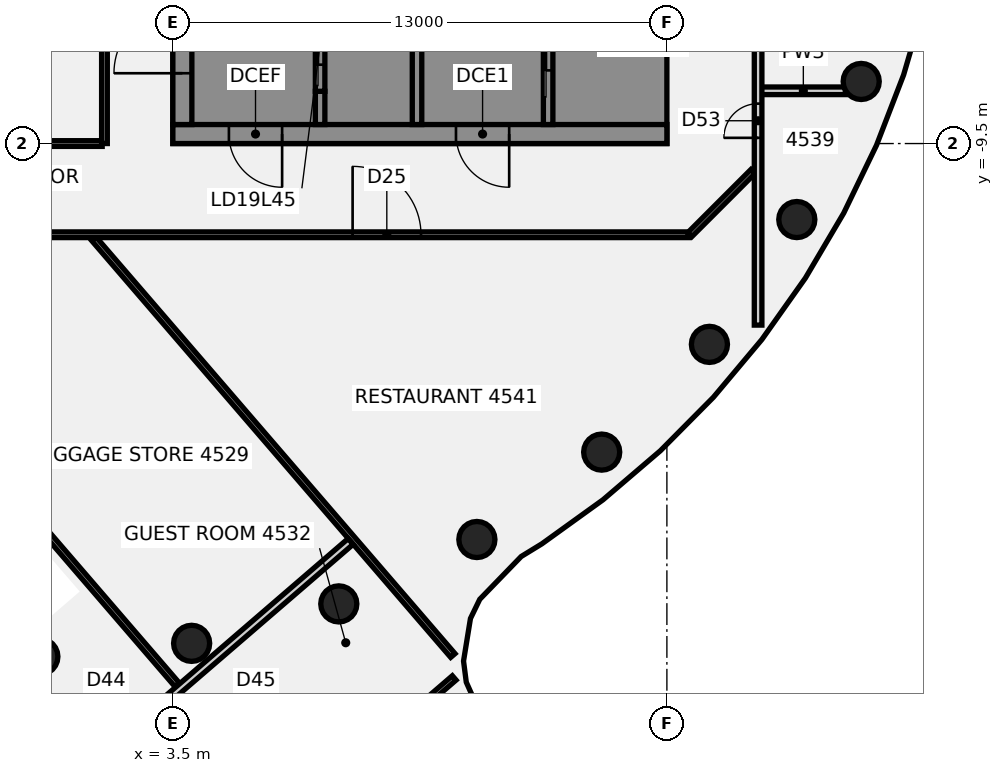
"""IFC4 building model, lengths in metres.
Left out: names, types, materials, properties, quantities, classifications, styles, units other than length and angle.
Written with IfcOpenShell. Run it as: python <this file> out.ifc"""

import sys

from ifc_helpers import new_model, si_unit, direction, frame, frame_2d, origin, origin_2d, place, context, subcontext, project, spatial, polyline, rectangle, circle, outline, extrude, element, fill, save


model = new_model("IFC4")
c1 = context("Model", 3, precision=1e-05, world=origin(), true_north=direction((0.0, 1.0)))
c2 = subcontext(c1, "Body", "Model", "MODEL_VIEW")
j1 = project(units=[si_unit("LENGTHUNIT", "METRE"), si_unit("PLANEANGLEUNIT", "RADIAN")], contexts=[c1])
p1 = place(None, origin())
s1 = spatial("IfcSite", under=j1, at=p1, CompositionType="ELEMENT")
p2 = place(p1, origin())
s2 = spatial("IfcBuilding", under=s1, at=p2, CompositionType="ELEMENT")
p3 = place(p2, frame((0.0, 0.0, 182.5)))
s3 = spatial("IfcBuildingStorey", under=s2, at=p3, CompositionType="ELEMENT", Elevation=182.5)
for number, where, z_axis, x_axis in (
    (1, (0.0, -23.0, -0.14), (0.0, 0.0, 1.0), (1.0, 0.0, 0.0)),
    (2, (3.994, -22.651, -0.14), (0.0, 0.0, 1.0), (1.0, 0.0, 0.0)),
    (3, (7.866, -21.613, -0.14), (0.0, 0.0, 1.0), (1.0, 0.0, 0.0)),
    (4, (11.5, -19.919, -0.14), (0.0, 0.0, 1.0), (1.0, 0.0, 0.0)),
    (5, (14.784, -17.619, -0.14), (0.0, 0.0, 1.0), (1.0, 0.0, 0.0)),
    (6, (17.619, -14.784, -0.14), (0.0, 0.0, 1.0), (1.0, 0.0, 0.0)),
    (7, (19.919, -11.5, -0.14), (0.0, 0.0, 1.0), (1.0, 0.0, 0.0)),
    (8, (21.613, -7.866, -0.14), (0.0, 0.0, 1.0), (1.0, 0.0, 0.0)),
):
    element("IfcColumn", number, at=place(p3, frame(where, z_axis=z_axis, x_axis=x_axis)), inside=s3, PredefinedType="COLUMN", context=c2, shape_type="SweptSolid", body=[
        extrude(circle(Radius=0.475, at=origin_2d()), origin(), (0.0, 0.0, 1.0), 3.6),
    ])
p4 = place(p3, frame((9.584, -24.698, -0.135), z_axis=(0.013229584391, 0.048576320124, 0.998731855515), x_axis=(-0.757717932984, -0.651247732409, 0.04171240903)))
e9 = element("IfcColumn", 9, at=p4, inside=s3, PredefinedType="COLUMN", context=c2, shape_type="SweptSolid", body=[
    extrude(rectangle(XDim=0.9, YDim=0.9, at=origin_2d()), origin(), (0.0, 0.0, 1.0), 3.599),
])
p5 = place(p3, frame((-10.298, -12.499, 0.0), z_axis=(0.0, 0.0, 1.0), x_axis=(0.652713185698, -0.757605106382, 0.0)))
e10 = element("IfcWall", 10, at=p5, inside=s3, PredefinedType="PARTITIONING", context=c2, shape_type="SweptSolid", body=[
    extrude(rectangle(XDim=17.62, YDim=0.15, at=frame_2d((8.81, 0.0))), origin(), (0.0, 0.0, 1.0), 2.864),
])
p6 = place(p5, frame((8.22, 0.0, 0.0)))
e11 = element("IfcOpeningElement", 11, at=p6, cuts=e10, PredefinedType="OPENING", context=c2, shape_type="SweptSolid", body=[
    extrude(rectangle(XDim=1.8, YDim=2.1, at=frame_2d((0.9, 1.05))), frame((0.0, 0.085, 0.0), z_axis=(0.0, -1.0, 0.0), x_axis=(1.0, 0.0, 0.0)), (0.0, 0.0, 1.0), 0.17),
])
p7 = place(p3, frame((-6.499, -12.006, 0.0), z_axis=(0.0, 0.0, 1.0), x_axis=(0.65272794867, -0.757592387122, 0.0)))
e12 = element("IfcWall", 12, at=p7, inside=s3, PredefinedType="PARTITIONING", context=c2, shape_type="SweptSolid", body=[
    extrude(rectangle(XDim=15.494, YDim=0.15, at=frame_2d((7.747, 0.0))), origin(), (0.0, 0.0, 1.0), 2.864),
])
p8 = place(p7, frame((5.11, 0.0, 0.0)))
e13 = element("IfcOpeningElement", 13, at=p8, cuts=e12, PredefinedType="OPENING", context=c2, shape_type="SweptSolid", body=[
    extrude(rectangle(XDim=0.9, YDim=2.1, at=frame_2d((0.45, 1.05))), frame((0.0, 0.085, 0.0), z_axis=(0.0, -1.0, 0.0), x_axis=(1.0, 0.0, 0.0)), (0.0, 0.0, 1.0), 0.17),
])
p9 = place(p3, frame((1.421, -12.006, 0.0), z_axis=(0.0, 0.0, 1.0), x_axis=(0.652713345428, -0.757604968767, 0.0)))
e14 = element("IfcWall", 14, at=p9, inside=s3, PredefinedType="PARTITIONING", context=c2, shape_type="SweptSolid", body=[
    extrude(rectangle(XDim=14.473, YDim=0.15, at=frame_2d((7.236, 0.0))), origin(), (0.0, 0.0, 1.0), 2.864),
])
p10 = place(p3, frame((-17.1, -11.9, 0.0), z_axis=(0.0, 0.0, 1.0), x_axis=(1.0, 0.0, 0.0)))
e15 = element("IfcWall", 15, at=p10, inside=s3, PredefinedType="PARTITIONING", context=c2, shape_type="SweptSolid", body=[
    extrude(rectangle(XDim=34.165, YDim=0.15, at=frame_2d((17.083, 0.0))), origin(), (0.0, 0.0, 1.0), 2.864),
])
p11 = place(p10, frame((8.274, 0.0, 0.0)))
e16 = element("IfcOpeningElement", 16, at=p11, cuts=e15, PredefinedType="OPENING", context=c2, shape_type="SweptSolid", body=[
    extrude(rectangle(XDim=1.8, YDim=2.1, at=frame_2d((0.9, 1.05))), frame((0.0, 0.085, 0.0), z_axis=(0.0, -1.0, 0.0), x_axis=(1.0, 0.0, 0.0)), (0.0, 0.0, 1.0), 0.17),
])
p12 = place(p10, frame((2.1, 0.0, 0.0)))
e17 = element("IfcOpeningElement", 17, at=p12, cuts=e15, PredefinedType="OPENING", context=c2, shape_type="SweptSolid", body=[
    extrude(rectangle(XDim=1.8, YDim=2.1, at=frame_2d((0.9, 1.05))), frame((0.0, 0.085, 0.0), z_axis=(0.0, -1.0, 0.0), x_axis=(1.0, 0.0, 0.0)), (0.0, 0.0, 1.0), 0.17),
])
p13 = place(p10, frame((25.33, 0.0, 0.0)))
e18 = element("IfcOpeningElement", 18, at=p13, cuts=e15, PredefinedType="OPENING", context=c2, shape_type="SweptSolid", body=[
    extrude(rectangle(XDim=1.8, YDim=2.1, at=frame_2d((0.9, 1.05))), frame((0.0, 0.085, 0.0), z_axis=(0.0, -1.0, 0.0), x_axis=(1.0, 0.0, 0.0)), (0.0, 0.0, 1.0), 0.17),
])
p14 = place(p3, frame((-1.64, -9.5, 0.0), z_axis=(0.0, 0.0, 1.0), x_axis=(1.0, 0.0, 0.0)))
e19 = element("IfcWall", 19, at=p14, inside=s3, PredefinedType="PARTITIONING", context=c2, shape_type="SweptSolid", body=[
    extrude(rectangle(XDim=3.28, YDim=0.15, at=frame_2d((1.64, 0.0))), origin(), (0.0, 0.0, 1.0), 2.864),
])
p15 = place(p3, frame((18.985, -8.112, 0.0), z_axis=(0.0, 0.0, 1.0), x_axis=(1.0, 0.0, 0.0)))
e20 = element("IfcWall", 20, at=p15, inside=s3, PredefinedType="PARTITIONING", context=c2, shape_type="SweptSolid", body=[
    extrude(rectangle(XDim=2.211, YDim=0.2, at=frame_2d((1.105, 0.0))), origin(), (0.0, 0.0, 1.0), 2.864),
])
p16 = place(p3, frame((-2.595, -29.251, 0.0), z_axis=(0.0, 0.0, 1.0), x_axis=(0.757604641141, 0.652713725704, 0.0)))
e21 = element("IfcWall", 21, at=p16, inside=s3, PredefinedType="PARTITIONING", context=c2, shape_type="SweptSolid", body=[
    extrude(rectangle(XDim=14.219, YDim=0.2, at=frame_2d((7.109, 0.0))), origin(), (0.0, 0.0, 1.0), 2.864),
])
p17 = place(p16, frame((5.799, 0.0, 0.0)))
e22 = element("IfcOpeningElement", 22, at=p17, cuts=e21, PredefinedType="OPENING", context=c2, shape_type="SweptSolid", body=[
    extrude(rectangle(XDim=1.4, YDim=2.1, at=frame_2d((0.7, 1.05))), frame((0.0, 0.11, 0.0), z_axis=(0.0, -1.0, 0.0), x_axis=(1.0, 0.0, 0.0)), (0.0, 0.0, 1.0), 0.22),
])
p18 = place(p3, frame((10.048, -24.299, 0.0), z_axis=(0.0, 0.0, 1.0), x_axis=(0.75736205632, 0.652995188074, 0.0)))
e23 = element("IfcWall", 23, at=p18, inside=s3, PredefinedType="PARTITIONING", context=c2, shape_type="SweptSolid", body=[
    extrude(rectangle(XDim=1.13, YDim=0.15, at=frame_2d((0.565, 0.0))), origin(), (0.0, 0.0, 1.0), 2.864),
])
p19 = place(p3, frame((17.1, -11.9, 0.0), z_axis=(0.0, 0.0, 1.0), x_axis=(0.707106781187, 0.707106781187, 0.0)))
e24 = element("IfcWall", 24, at=p19, inside=s3, PredefinedType="PARTITIONING", context=c2, shape_type="SweptSolid", body=[
    extrude(rectangle(XDim=2.355, YDim=0.15, at=frame_2d((1.178, 0.0))), origin(), (0.0, 0.0, 1.0), 2.864),
])
p20 = place(p3, frame((1.7, -9.5, 0.0), z_axis=(0.0, 0.0, 1.0), x_axis=(0.0, 1.0, 0.0)))
e25 = element("IfcWall", 25, at=p20, inside=s3, PredefinedType="PARTITIONING", context=c2, shape_type="SweptSolid", body=[
    extrude(rectangle(XDim=19.0, YDim=0.15, at=frame_2d((9.5, 0.0))), origin(), (0.0, 0.0, 1.0), 2.864),
])
p21 = place(p3, frame((18.9, -14.277, 0.0), z_axis=(0.0, 0.0, 1.0), x_axis=(0.0, 1.0, 0.0)))
e26 = element("IfcWall", 26, at=p21, inside=s3, PredefinedType="PARTITIONING", context=c2, shape_type="SweptSolid", body=[
    extrude(rectangle(XDim=24.377, YDim=0.2, at=frame_2d((12.188, 0.0))), origin(), (0.0, 0.0, 1.0), 2.864),
])
p22 = place(p21, frame((4.927, 0.0, 0.0)))
e27 = element("IfcOpeningElement", 27, at=p22, cuts=e26, PredefinedType="OPENING", context=c2, shape_type="SweptSolid", body=[
    extrude(rectangle(XDim=0.9, YDim=2.1, at=frame_2d((0.45, 1.05))), frame((0.0, 0.11, 0.0), z_axis=(0.0, -1.0, 0.0), x_axis=(1.0, 0.0, 0.0)), (0.0, 0.0, 1.0), 0.22),
])
p23 = place(p21, frame((21.481, 0.0, 0.0)))
e28 = element("IfcOpeningElement", 28, at=p23, cuts=e26, PredefinedType="OPENING", context=c2, shape_type="SweptSolid", body=[
    extrude(rectangle(XDim=0.9, YDim=2.1, at=frame_2d((0.45, 1.05))), frame((0.0, 0.11, 0.0), z_axis=(0.0, -1.0, 0.0), x_axis=(1.0, 0.0, 0.0)), (0.0, 0.0, 1.0), 0.22),
])
p24 = place(p3, frame((16.5, -9.25, 0.0), z_axis=(0.0, 0.0, 1.0), x_axis=(-1.0, 0.0, 0.0)))
e29 = element("IfcWall", 29, at=p24, inside=s3, PredefinedType="SHEAR", context=c2, shape_type="SweptSolid", body=[
    extrude(rectangle(XDim=13.0, YDim=0.5, at=frame_2d((6.5, 0.0))), origin(), (0.0, 0.0, 1.0), 3.46),
])
p25 = place(p24, frame((4.15, 0.0, 0.0)))
e30 = element("IfcOpeningElement", 30, at=p25, cuts=e29, PredefinedType="OPENING", context=c2, shape_type="SweptSolid", body=[
    extrude(rectangle(XDim=1.4, YDim=2.1, at=frame_2d((0.7, 1.05))), frame((0.0, 0.26, 0.0), z_axis=(0.0, -1.0, 0.0), x_axis=(1.0, 0.0, 0.0)), (0.0, 0.0, 1.0), 0.52),
])
p26 = place(p24, frame((10.125, 0.0, 0.0)))
e31 = element("IfcOpeningElement", 31, at=p26, cuts=e29, PredefinedType="OPENING", context=c2, shape_type="SweptSolid", body=[
    extrude(rectangle(XDim=1.4, YDim=2.1, at=frame_2d((0.7, 1.05))), frame((0.0, 0.26, 0.0), z_axis=(0.0, -1.0, 0.0), x_axis=(1.0, 0.0, 0.0)), (0.0, 0.0, 1.0), 0.52),
])
p27 = place(p3, origin())
e32 = element("IfcWall", 32, at=p27, inside=s3, PredefinedType="SHEAR", context=c2, shape_type="SweptSolid", body=[
    extrude(outline(polyline([(13.5, -8.125), (13.5, -9.0), (16.0, -9.0), (16.5, -9.0), (16.5, 9.0), (16.0, 9.0), (13.5, 9.0), (13.5, 8.125), (16.0, 8.125), (16.0, 5.625), (13.5, 5.625), (13.5, 5.375), (16.0, 5.375), (16.0, -5.375), (13.5, -5.375), (13.5, -5.625), (16.0, -5.625), (16.0, -8.125), (13.5, -8.125)])), origin(), (0.0, 0.0, 1.0), 3.46),
])
p28 = place(p3, origin())
e33 = element("IfcWall", 33, at=p28, inside=s3, PredefinedType="SHEAR", context=c2, shape_type="SweptSolid", body=[
    extrude(outline(polyline([(7.5, -8.125), (7.5, -9.0), (9.8, -9.0), (9.8, -8.125), (9.8, -5.625), (9.55, -5.625), (9.55, -8.125), (7.5, -8.125)])), origin(), (0.0, 0.0, 1.0), 3.46),
])
p29 = place(p3, frame((7.375, -9.0, 0.0), z_axis=(0.0, 0.0, 1.0), x_axis=(0.0, 1.0, 0.0)))
e34 = element("IfcWall", 34, at=p29, inside=s3, PredefinedType="SHEAR", context=c2, shape_type="SweptSolid", body=[
    extrude(rectangle(XDim=0.875, YDim=0.25, at=frame_2d((0.438, 0.0))), origin(), (0.0, 0.0, 1.0), 3.46),
])
p30 = place(p3, frame((13.375, -9.0, 0.0), z_axis=(0.0, 0.0, 1.0), x_axis=(0.0, 1.0, 0.0)))
e35 = element("IfcWall", 35, at=p30, inside=s3, PredefinedType="SHEAR", context=c2, shape_type="SweptSolid", body=[
    extrude(rectangle(XDim=18.0, YDim=0.25, at=frame_2d((9.0, 0.0))), origin(), (0.0, 0.0, 1.0), 3.46),
])
p31 = place(p30, frame((1.425, 0.0, 0.0)))
e36 = element("IfcOpeningElement", 36, at=p31, cuts=e35, PredefinedType="OPENING", context=c2, shape_type="SweptSolid", body=[
    extrude(rectangle(XDim=1.4, YDim=2.1, at=frame_2d((0.7, 1.05))), frame((0.0, 0.135, 0.0), z_axis=(0.0, -1.0, 0.0), x_axis=(1.0, 0.0, 0.0)), (0.0, 0.0, 1.0), 0.27),
])
p32 = place(p30, frame((8.5, 0.0, 0.0)))
e37 = element("IfcOpeningElement", 37, at=p32, cuts=e35, PredefinedType="OPENING", context=c2, shape_type="SweptSolid", body=[
    extrude(rectangle(XDim=1.0, YDim=2.1, at=frame_2d((0.5, 1.05))), frame((0.0, 0.135, 0.0), z_axis=(0.0, -1.0, 0.0), x_axis=(1.0, 0.0, 0.0)), (0.0, 0.0, 1.0), 0.27),
])
p33 = place(p3, frame((9.925, -9.0, 0.0), z_axis=(0.0, 0.0, 1.0), x_axis=(0.0, 1.0, 0.0)))
e38 = element("IfcWall", 38, at=p33, inside=s3, PredefinedType="SHEAR", context=c2, shape_type="SweptSolid", body=[
    extrude(rectangle(XDim=18.0, YDim=0.25, at=frame_2d((9.0, 0.0))), origin(), (0.0, 0.0, 1.0), 3.46),
])
p34 = place(p33, frame((4.275, 0.0, 0.0)))
e39 = element("IfcOpeningElement", 39, at=p34, cuts=e38, PredefinedType="OPENING", context=c2, shape_type="SweptSolid", body=[
    extrude(rectangle(XDim=1.2, YDim=2.1, at=frame_2d((0.6, 1.05))), frame((0.0, 0.135, 0.0), z_axis=(0.0, -1.0, 0.0), x_axis=(1.0, 0.0, 0.0)), (0.0, 0.0, 1.0), 0.27),
])
p35 = place(p33, frame((7.025, 0.0, 0.0)))
e40 = element("IfcOpeningElement", 40, at=p35, cuts=e38, PredefinedType="OPENING", context=c2, shape_type="SweptSolid", body=[
    extrude(rectangle(XDim=1.2, YDim=2.1, at=frame_2d((0.6, 1.05))), frame((0.0, 0.135, 0.0), z_axis=(0.0, -1.0, 0.0), x_axis=(1.0, 0.0, 0.0)), (0.0, 0.0, 1.0), 0.27),
])
p36 = place(p33, frame((9.825, 0.0, 0.0)))
e41 = element("IfcOpeningElement", 41, at=p36, cuts=e38, PredefinedType="OPENING", context=c2, shape_type="SweptSolid", body=[
    extrude(rectangle(XDim=1.1, YDim=2.1, at=frame_2d((0.55, 1.05))), frame((0.0, 0.135, 0.0), z_axis=(0.0, -1.0, 0.0), x_axis=(1.0, 0.0, 0.0)), (0.0, 0.0, 1.0), 0.27),
])
p37 = place(p3, frame((7.375, -8.125, 0.0), z_axis=(0.0, 0.0, 1.0), x_axis=(0.0, 1.0, 0.0)))
e42 = element("IfcWall", 42, at=p37, inside=s3, PredefinedType="SHEAR", context=c2, shape_type="SweptSolid", body=[
    extrude(rectangle(XDim=2.5, YDim=0.25, at=frame_2d((1.25, 0.0))), origin(), (0.0, 0.0, 1.0), 3.46),
])
p38 = place(p37, frame((0.7, 0.0, 0.0)))
e43 = element("IfcOpeningElement", 43, at=p38, cuts=e42, PredefinedType="OPENING", context=c2, shape_type="SweptSolid", body=[
    extrude(rectangle(XDim=1.1, YDim=2.1, at=frame_2d((0.55, 1.05))), frame((0.0, 0.135, 0.0), z_axis=(0.0, -1.0, 0.0), x_axis=(1.0, 0.0, 0.0)), (0.0, 0.0, 1.0), 0.27),
])
p39 = place(p3, frame((3.75, -9.0, 0.0), z_axis=(0.0, 0.0, 1.0), x_axis=(0.0, 1.0, 0.0)))
e44 = element("IfcWall", 44, at=p39, inside=s3, PredefinedType="SHEAR", context=c2, shape_type="SweptSolid", body=[
    extrude(rectangle(XDim=18.0, YDim=0.5, at=frame_2d((9.0, 0.0))), origin(), (0.0, 0.0, 1.0), 3.46),
])
p40 = place(p39, frame((1.35, 0.0, 0.0)))
e45 = element("IfcOpeningElement", 45, at=p40, cuts=e44, PredefinedType="OPENING", context=c2, shape_type="SweptSolid", body=[
    extrude(rectangle(XDim=1.8, YDim=2.1, at=frame_2d((0.9, 1.05))), frame((0.0, 0.26, 0.0), z_axis=(0.0, -1.0, 0.0), x_axis=(1.0, 0.0, 0.0)), (0.0, 0.0, 1.0), 0.52),
])
p41 = place(p39, frame((11.798, 0.0, 0.0)))
e46 = element("IfcOpeningElement", 46, at=p41, cuts=e44, PredefinedType="OPENING", context=c2, shape_type="SweptSolid", body=[
    extrude(rectangle(XDim=1.0, YDim=2.1, at=frame_2d((0.5, 1.05))), frame((0.0, 0.26, 0.0), z_axis=(0.0, -1.0, 0.0), x_axis=(1.0, 0.0, 0.0)), (0.0, 0.0, 1.0), 0.52),
])
p42 = place(p39, frame((15.323, 0.0, 0.0)))
e47 = element("IfcOpeningElement", 47, at=p42, cuts=e44, PredefinedType="OPENING", context=c2, shape_type="SweptSolid", body=[
    extrude(rectangle(XDim=1.0, YDim=2.1, at=frame_2d((0.5, 1.05))), frame((0.0, 0.26, 0.0), z_axis=(0.0, -1.0, 0.0), x_axis=(1.0, 0.0, 0.0)), (0.0, 0.0, 1.0), 0.52),
])
p43 = place(p13, origin())
e48 = element("IfcDoor", 48, at=p43, inside=s3, OperationType="DOUBLE_DOOR_SINGLE_SWING", PredefinedType="DOOR", context=c2, shape_type="SweptSolid", body=[
    extrude(rectangle(XDim=1.8, YDim=2.1, at=frame_2d((0.9, 1.05))), frame((0.0, 0.025, 0.0), z_axis=(0.0, -1.0, 0.0), x_axis=(1.0, 0.0, 0.0)), (0.0, 0.0, 1.0), 0.05),
])
fill(e18, e48)
p44 = place(p22, frame((0.9, 0.0, 0.0), z_axis=(0.0, 0.0, 1.0), x_axis=(-1.0, 0.0, 0.0)))
e49 = element("IfcDoor", 49, at=p44, inside=s3, OperationType="SINGLE_SWING_LEFT", PredefinedType="DOOR", context=c2, shape_type="SweptSolid", body=[
    extrude(rectangle(XDim=0.9, YDim=2.1, at=frame_2d((0.45, 1.05))), frame((0.0, 0.025, 0.0), z_axis=(0.0, -1.0, 0.0), x_axis=(1.0, 0.0, 0.0)), (0.0, 0.0, 1.0), 0.05),
])
fill(e27, e49)
p45 = place(p25, origin())
e50 = element("IfcDoor", 50, at=p45, inside=s3, OperationType="SINGLE_SWING_LEFT", PredefinedType="DOOR", context=c2, shape_type="SweptSolid", body=[
    extrude(rectangle(XDim=1.4, YDim=2.1, at=frame_2d((0.7, 1.05))), frame((0.0, 0.025, 0.0), z_axis=(0.0, -1.0, 0.0), x_axis=(1.0, 0.0, 0.0)), (0.0, 0.0, 1.0), 0.05),
])
fill(e30, e50)
p46 = place(p26, origin())
e51 = element("IfcDoor", 51, at=p46, inside=s3, OperationType="SINGLE_SWING_LEFT", PredefinedType="DOOR", context=c2, shape_type="SweptSolid", body=[
    extrude(rectangle(XDim=1.4, YDim=2.1, at=frame_2d((0.7, 1.05))), frame((0.0, 0.025, 0.0), z_axis=(0.0, -1.0, 0.0), x_axis=(1.0, 0.0, 0.0)), (0.0, 0.0, 1.0), 0.05),
])
fill(e31, e51)
p47 = place(p40, origin())
e52 = element("IfcDoor", 52, at=p47, inside=s3, OperationType="SINGLE_SWING_LEFT", PredefinedType="DOOR", context=c2, shape_type="SweptSolid", body=[
    extrude(rectangle(XDim=1.8, YDim=2.1, at=frame_2d((0.9, 1.05))), frame((0.0, 0.025, 0.0), z_axis=(0.0, -1.0, 0.0), x_axis=(1.0, 0.0, 0.0)), (0.0, 0.0, 1.0), 0.05),
])
fill(e45, e52)
p48 = place(p31, origin())
e53 = element("IfcDoor", 53, at=p48, inside=s3, OperationType="SLIDING_TO_LEFT", PredefinedType="DOOR", context=c2, shape_type="SweptSolid", body=[
    extrude(rectangle(XDim=1.4, YDim=2.1, at=frame_2d((0.7, 1.05))), frame((0.0, 0.025, 0.0), z_axis=(0.0, -1.0, 0.0), x_axis=(1.0, 0.0, 0.0)), (0.0, 0.0, 1.0), 0.05),
])
fill(e36, e53)
p49 = place(p38, origin())
e54 = element("IfcDoor", 54, at=p49, inside=s3, OperationType="SLIDING_TO_LEFT", PredefinedType="DOOR", context=c2, shape_type="SweptSolid", body=[
    extrude(rectangle(XDim=1.1, YDim=2.1, at=frame_2d((0.55, 1.05))), frame((0.0, 0.025, 0.0), z_axis=(0.0, -1.0, 0.0), x_axis=(1.0, 0.0, 0.0)), (0.0, 0.0, 1.0), 0.05),
])
fill(e43, e54)
save(model, sys.argv[1])
